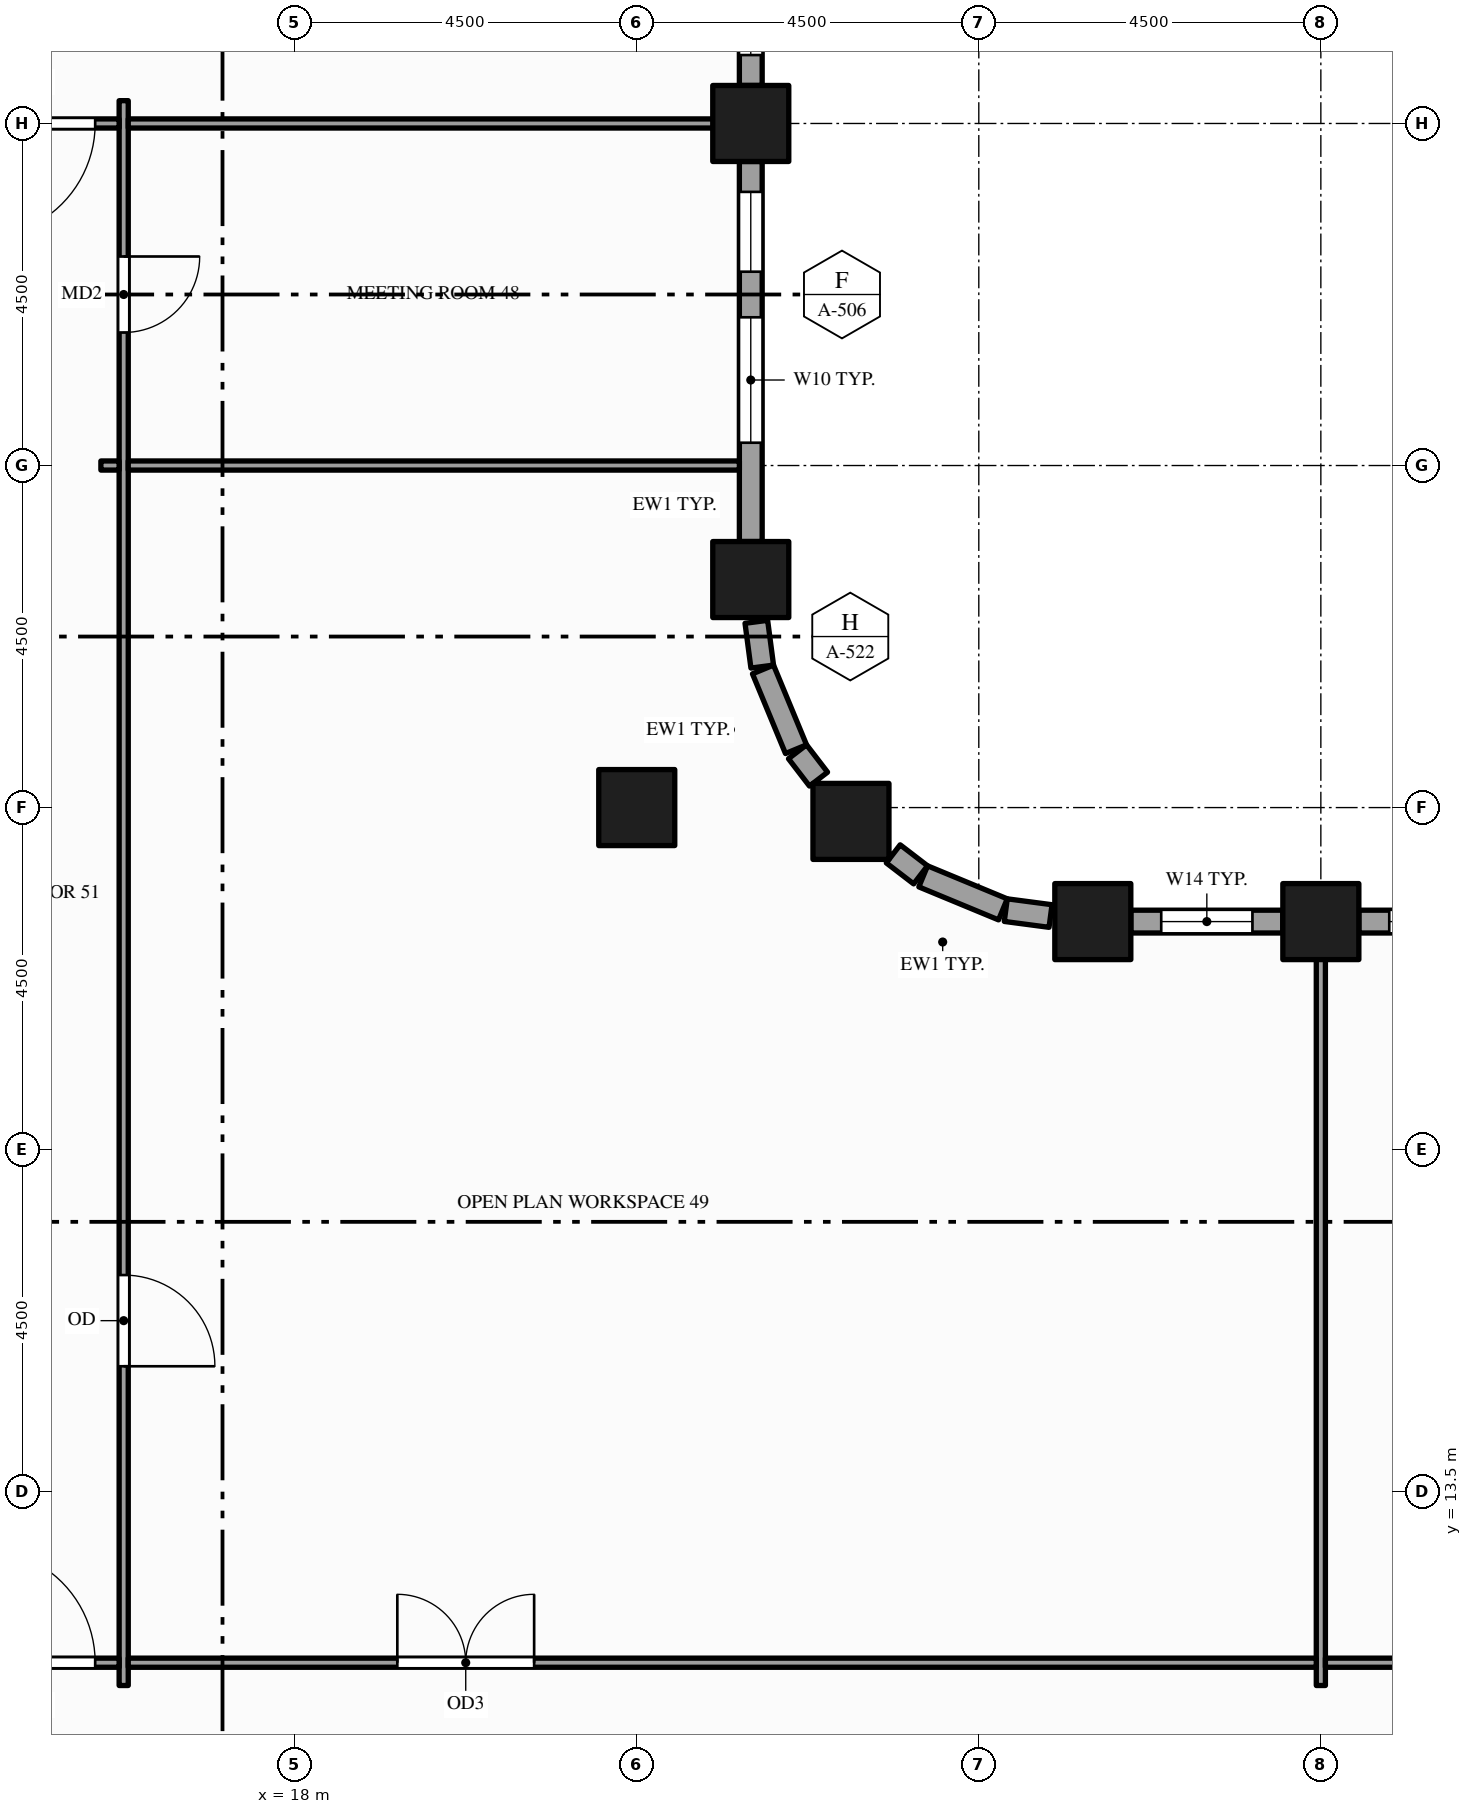
"""IFC4 building model, lengths in metres.
Left out: names, types, materials, properties, quantities, classifications, styles, units other than length and angle.
Written with IfcOpenShell. Run it as: python <this file> out.ifc"""

import sys

from ifc_helpers import new_model, si_unit, direction, frame, frame_2d, origin, origin_2d, place, context, subcontext, project, spatial, rectangle, hollow_rectangle, extrude, element, fill, save


model = new_model("IFC4")
c1 = context("Model", 3, precision=1e-05, world=origin(), true_north=direction((0.0, 1.0)))
c2 = subcontext(c1, "Body", "Model", "MODEL_VIEW")
j1 = project(units=[si_unit("LENGTHUNIT", "METRE"), si_unit("PLANEANGLEUNIT", "RADIAN")], contexts=[c1])
p1 = place(None, origin())
s1 = spatial("IfcSite", under=j1, at=p1, CompositionType="ELEMENT")
p2 = place(p1, origin())
s2 = spatial("IfcBuilding", under=s1, at=p2, CompositionType="ELEMENT")
p3 = place(p2, frame((0.0, 0.0, 119.0)))
s3 = spatial("IfcBuildingStorey", under=s2, at=p3, CompositionType="ELEMENT", Elevation=119.0)
for number, where, z_axis, x_axis in (
    (1, (22.5, 22.5, -0.15), (0.0, 0.0, 1.0), (1.0, 0.0, 0.0)),
    (2, (24.0, 25.5, -0.15), (0.0, 0.0, 1.0), (1.0, 0.0, 0.0)),
    (3, (24.0, 31.5, -0.15), (0.0, 0.0, 1.0), (1.0, 0.0, 0.0)),
    (4, (25.318, 22.318, -0.15), (0.0, 0.0, 1.0), (1.0, 0.0, 0.0)),
    (5, (28.5, 21.0, -0.15), (0.0, 0.0, 1.0), (1.0, 0.0, 0.0)),
    (6, (31.5, 21.0, -0.15), (0.0, 0.0, 1.0), (1.0, 0.0, 0.0)),
):
    element("IfcColumn", number, at=place(p3, frame(where, z_axis=z_axis, x_axis=x_axis)), inside=s3, PredefinedType="COLUMN", context=c2, shape_type="SweptSolid", body=[
        extrude(hollow_rectangle(XDim=1.0, YDim=1.0, WallThickness=0.05, at=origin_2d()), origin(), (0.0, 0.0, 1.0), 4.0),
    ])
p4 = place(p3, frame((35.5, 21.0, 0.0), z_axis=(0.0, 0.0, 1.0), x_axis=(-1.0, 0.0, 0.0)))
e7 = element("IfcWall", 7, at=p4, inside=s3, PredefinedType="STANDARD", context=c2, shape_type="SweptSolid", body=[
    extrude(rectangle(XDim=3.5, YDim=0.3, at=frame_2d((1.75, 0.0))), origin(), (0.0, 0.0, 1.0), 3.154),
])
p5 = place(p4, frame((0.4, 0.0, 0.9)))
e8 = element("IfcOpeningElement", 8, at=p5, cuts=e7, PredefinedType="OPENING", context=c2, shape_type="SweptSolid", body=[
    extrude(rectangle(XDim=1.05, YDim=2.0, at=frame_2d((0.525, 1.0))), frame((0.0, 0.16, 0.0), z_axis=(0.0, -1.0, 0.0), x_axis=(1.0, 0.0, 0.0)), (0.0, 0.0, 1.0), 0.32),
])
p6 = place(p4, frame((2.05, 0.0, 0.9)))
e9 = element("IfcOpeningElement", 9, at=p6, cuts=e7, PredefinedType="OPENING", context=c2, shape_type="SweptSolid", body=[
    extrude(rectangle(XDim=1.05, YDim=2.0, at=frame_2d((0.525, 1.0))), frame((0.0, 0.16, 0.0), z_axis=(0.0, -1.0, 0.0), x_axis=(1.0, 0.0, 0.0)), (0.0, 0.0, 1.0), 0.32),
])
p7 = place(p3, frame((31.0, 21.0, 0.0), z_axis=(0.0, 0.0, 1.0), x_axis=(-1.0, 0.0, 0.0)))
e10 = element("IfcWall", 10, at=p7, inside=s3, PredefinedType="STANDARD", context=c2, shape_type="SweptSolid", body=[
    extrude(rectangle(XDim=2.0, YDim=0.3, at=frame_2d((1.0, 0.0))), origin(), (0.0, 0.0, 1.0), 3.154),
])
p8 = place(p7, frame((0.4, 0.0, 0.9)))
e11 = element("IfcOpeningElement", 11, at=p8, cuts=e10, PredefinedType="OPENING", context=c2, shape_type="SweptSolid", body=[
    extrude(rectangle(XDim=1.2, YDim=2.0, at=frame_2d((0.6, 1.0))), frame((0.0, 0.16, 0.0), z_axis=(0.0, -1.0, 0.0), x_axis=(1.0, 0.0, 0.0)), (0.0, 0.0, 1.0), 0.32),
])
p9 = place(p3, frame((27.944, 21.073, 0.0), z_axis=(0.0, 0.0, 1.0), x_axis=(-0.991420685839, 0.130709692412, 0.0)))
e12 = element("IfcWall", 12, at=p9, inside=s3, PredefinedType="STANDARD", context=c2, shape_type="SweptSolid", body=[
    extrude(rectangle(XDim=0.594, YDim=0.3, at=frame_2d((0.297, 0.0))), origin(), (0.0, 0.0, 1.0), 3.154),
])
p10 = place(p3, frame((27.317, 21.161, 0.0), z_axis=(0.0, 0.0, 1.0), x_axis=(-0.923914616768, 0.382598720491, 0.0)))
e13 = element("IfcWall", 13, at=p10, inside=s3, PredefinedType="STANDARD", context=c2, shape_type="SweptSolid", body=[
    extrude(rectangle(XDim=1.135, YDim=0.3, at=frame_2d((0.568, 0.0))), origin(), (0.0, 0.0, 1.0), 2.938),
])
p11 = place(p3, frame((26.234, 21.615, 0.0), z_axis=(0.0, 0.0, 1.0), x_axis=(-0.793563062559, 0.608488016104, 0.0)))
e14 = element("IfcWall", 14, at=p11, inside=s3, PredefinedType="STANDARD", context=c2, shape_type="SweptSolid", body=[
    extrude(rectangle(XDim=0.454, YDim=0.3, at=frame_2d((0.227, 0.0))), origin(), (0.0, 0.0, 1.0), 3.154),
])
p12 = place(p3, frame((24.891, 22.874, 0.0), z_axis=(0.0, 0.0, 1.0), x_axis=(-0.608488016104, 0.793563062559, 0.0)))
e15 = element("IfcWall", 15, at=p12, inside=s3, PredefinedType="STANDARD", context=c2, shape_type="SweptSolid", body=[
    extrude(rectangle(XDim=0.454, YDim=0.3, at=frame_2d((0.227, 0.0))), origin(), (0.0, 0.0, 1.0), 2.76),
])
p13 = place(p3, frame((24.595, 23.268, 0.0), z_axis=(0.0, 0.0, 1.0), x_axis=(-0.382598720491, 0.923914616768, 0.0)))
e16 = element("IfcWall", 16, at=p13, inside=s3, PredefinedType="STANDARD", context=c2, shape_type="SweptSolid", body=[
    extrude(rectangle(XDim=1.135, YDim=0.3, at=frame_2d((0.568, 0.0))), origin(), (0.0, 0.0, 1.0), 3.154),
])
p14 = place(p3, frame((24.151, 24.355, 0.0), z_axis=(0.0, 0.0, 1.0), x_axis=(-0.130709692412, 0.991420685839, 0.0)))
e17 = element("IfcWall", 17, at=p14, inside=s3, PredefinedType="STANDARD", context=c2, shape_type="SweptSolid", body=[
    extrude(rectangle(XDim=0.594, YDim=0.3, at=frame_2d((0.297, 0.0))), origin(), (0.0, 0.0, 1.0), 3.154),
])
p15 = place(p3, frame((24.0, 26.0, 0.0), z_axis=(0.0, 0.0, 1.0), x_axis=(0.0, 1.0, 0.0)))
e18 = element("IfcWall", 18, at=p15, inside=s3, PredefinedType="STANDARD", context=c2, shape_type="SweptSolid", body=[
    extrude(rectangle(XDim=5.0, YDim=0.3, at=frame_2d((2.5, 0.0))), origin(), (0.0, 0.0, 1.0), 3.154),
])
p16 = place(p15, frame((1.3, 0.0, 0.9)))
e19 = element("IfcOpeningElement", 19, at=p16, cuts=e18, PredefinedType="OPENING", context=c2, shape_type="SweptSolid", body=[
    extrude(rectangle(XDim=1.65, YDim=2.0, at=frame_2d((0.825, 1.0))), frame((0.0, 0.16, 0.0), z_axis=(0.0, -1.0, 0.0), x_axis=(1.0, 0.0, 0.0)), (0.0, 0.0, 1.0), 0.32),
])
p17 = place(p15, frame((3.55, 0.0, 0.9)))
e20 = element("IfcOpeningElement", 20, at=p17, cuts=e18, PredefinedType="OPENING", context=c2, shape_type="SweptSolid", body=[
    extrude(rectangle(XDim=1.05, YDim=2.0, at=frame_2d((0.525, 1.0))), frame((0.0, 0.16, 0.0), z_axis=(0.0, -1.0, 0.0), x_axis=(1.0, 0.0, 0.0)), (0.0, 0.0, 1.0), 0.32),
])
p18 = place(p3, frame((24.0, 32.0, 0.0), z_axis=(0.0, 0.0, 1.0), x_axis=(0.0, 1.0, 0.0)))
e21 = element("IfcWall", 21, at=p18, inside=s3, PredefinedType="STANDARD", context=c2, shape_type="SweptSolid", body=[
    extrude(rectangle(XDim=3.5, YDim=0.3, at=frame_2d((1.75, 0.0))), origin(), (0.0, 0.0, 1.0), 3.154),
])
p19 = place(p18, frame((0.4, 0.0, 0.9)))
e22 = element("IfcOpeningElement", 22, at=p19, cuts=e21, PredefinedType="OPENING", context=c2, shape_type="SweptSolid", body=[
    extrude(rectangle(XDim=1.05, YDim=2.0, at=frame_2d((0.525, 1.0))), frame((0.0, 0.16, 0.0), z_axis=(0.0, -1.0, 0.0), x_axis=(1.0, 0.0, 0.0)), (0.0, 0.0, 1.0), 0.32),
])
p20 = place(p18, frame((2.05, 0.0, 0.9)))
e23 = element("IfcOpeningElement", 23, at=p20, cuts=e21, PredefinedType="OPENING", context=c2, shape_type="SweptSolid", body=[
    extrude(rectangle(XDim=1.05, YDim=2.0, at=frame_2d((0.525, 1.0))), frame((0.0, 0.16, 0.0), z_axis=(0.0, -1.0, 0.0), x_axis=(1.0, 0.0, 0.0)), (0.0, 0.0, 1.0), 0.32),
])
p21 = place(p3, frame((15.75, 10.95, 0.0), z_axis=(0.0, 0.0, 1.0), x_axis=(0.0, 1.0, 0.0)))
e24 = element("IfcWall", 24, at=p21, inside=s3, PredefinedType="PARTITIONING", context=c2, shape_type="SweptSolid", body=[
    extrude(rectangle(XDim=20.85, YDim=0.12, at=frame_2d((10.425, 0.0))), origin(), (0.0, 0.0, 1.0), 2.6),
])
p22 = place(p21, frame((17.8, 0.0, 0.0)))
e25 = element("IfcOpeningElement", 25, at=p22, cuts=e24, PredefinedType="OPENING", context=c2, shape_type="SweptSolid", body=[
    extrude(rectangle(XDim=1.0, YDim=2.1, at=frame_2d((0.5, 1.05))), frame((0.0, 0.07, 0.0), z_axis=(0.0, -1.0, 0.0), x_axis=(1.0, 0.0, 0.0)), (0.0, 0.0, 1.0), 0.14),
])
p23 = place(p21, frame((4.2, 0.0, 0.0)))
e26 = element("IfcOpeningElement", 26, at=p23, cuts=e24, PredefinedType="OPENING", context=c2, shape_type="SweptSolid", body=[
    extrude(rectangle(XDim=1.2, YDim=2.1, at=frame_2d((0.6, 1.05))), frame((0.0, 0.07, 0.0), z_axis=(0.0, -1.0, 0.0), x_axis=(1.0, 0.0, 0.0)), (0.0, 0.0, 1.0), 0.14),
])
p24 = place(p3, frame((31.5, 10.95, 0.0), z_axis=(0.0, 0.0, 1.0), x_axis=(0.0, 1.0, 0.0)))
e27 = element("IfcWall", 27, at=p24, inside=s3, PredefinedType="PARTITIONING", context=c2, shape_type="SweptSolid", body=[
    extrude(rectangle(XDim=9.9, YDim=0.12, at=frame_2d((4.95, 0.0))), origin(), (0.0, 0.0, 1.0), 2.938),
])
p25 = place(p3, frame((13.56, 11.25, 0.0), z_axis=(0.0, 0.0, 1.0), x_axis=(1.0, 0.0, 0.0)))
e28 = element("IfcWall", 28, at=p25, inside=s3, PredefinedType="PARTITIONING", context=c2, shape_type="SweptSolid", body=[
    extrude(rectangle(XDim=2.13, YDim=0.12, at=frame_2d((1.065, 0.0))), origin(), (0.0, 0.0, 1.0), 2.938),
])
p26 = place(p25, frame((0.315, 0.0, 0.0)))
e29 = element("IfcOpeningElement", 29, at=p26, cuts=e28, PredefinedType="OPENING", context=c2, shape_type="SweptSolid", body=[
    extrude(rectangle(XDim=1.5, YDim=2.1, at=frame_2d((0.75, 1.05))), frame((0.0, 0.07, 0.0), z_axis=(0.0, -1.0, 0.0), x_axis=(1.0, 0.0, 0.0)), (0.0, 0.0, 1.0), 0.14),
])
p27 = place(p3, frame((15.81, 11.25, 0.0), z_axis=(0.0, 0.0, 1.0), x_axis=(1.0, 0.0, 0.0)))
e30 = element("IfcWall", 30, at=p27, inside=s3, PredefinedType="PARTITIONING", context=c2, shape_type="SweptSolid", body=[
    extrude(rectangle(XDim=15.63, YDim=0.12, at=frame_2d((7.815, 0.0))), origin(), (0.0, 0.0, 1.0), 2.76),
])
p28 = place(p27, frame((3.54, 0.0, 0.0)))
e31 = element("IfcOpeningElement", 31, at=p28, cuts=e30, PredefinedType="OPENING", context=c2, shape_type="SweptSolid", body=[
    extrude(rectangle(XDim=1.8, YDim=2.1, at=frame_2d((0.9, 1.05))), frame((0.0, 0.07, 0.0), z_axis=(0.0, -1.0, 0.0), x_axis=(1.0, 0.0, 0.0)), (0.0, 0.0, 1.0), 0.14),
])
p29 = place(p3, frame((31.56, 11.25, 0.0), z_axis=(0.0, 0.0, 1.0), x_axis=(1.0, 0.0, 0.0)))
e32 = element("IfcWall", 32, at=p29, inside=s3, PredefinedType="PARTITIONING", context=c2, shape_type="SweptSolid", body=[
    extrude(rectangle(XDim=4.38, YDim=0.12, at=frame_2d((2.19, 0.0))), origin(), (0.0, 0.0, 1.0), 2.938),
])
p30 = place(p29, frame((1.59, 0.0, 0.0)))
e33 = element("IfcOpeningElement", 33, at=p30, cuts=e32, PredefinedType="OPENING", context=c2, shape_type="SweptSolid", body=[
    extrude(rectangle(XDim=1.2, YDim=2.1, at=frame_2d((0.6, 1.05))), frame((0.0, 0.07, 0.0), z_axis=(0.0, -1.0, 0.0), x_axis=(1.0, 0.0, 0.0)), (0.0, 0.0, 1.0), 0.14),
])
p31 = place(p3, frame((15.45, 27.0, 0.0), z_axis=(0.0, 0.0, 1.0), x_axis=(1.0, 0.0, 0.0)))
e34 = element("IfcWall", 34, at=p31, inside=s3, PredefinedType="PARTITIONING", context=c2, shape_type="SweptSolid", body=[
    extrude(rectangle(XDim=0.24, YDim=0.12, at=frame_2d((0.12, 0.0))), origin(), (0.0, 0.0, 1.0), 2.938),
])
p32 = place(p3, frame((15.81, 27.0, 0.0), z_axis=(0.0, 0.0, 1.0), x_axis=(1.0, 0.0, 0.0)))
e35 = element("IfcWall", 35, at=p32, inside=s3, PredefinedType="PARTITIONING", context=c2, shape_type="SweptSolid", body=[
    extrude(rectangle(XDim=8.04, YDim=0.12, at=frame_2d((4.02, 0.0))), origin(), (0.0, 0.0, 1.0), 2.938),
])
p33 = place(p3, frame((13.56, 31.5, 0.0), z_axis=(0.0, 0.0, 1.0), x_axis=(1.0, 0.0, 0.0)))
e36 = element("IfcWall", 36, at=p33, inside=s3, PredefinedType="PARTITIONING", context=c2, shape_type="SweptSolid", body=[
    extrude(rectangle(XDim=2.13, YDim=0.12, at=frame_2d((1.065, 0.0))), origin(), (0.0, 0.0, 1.0), 2.938),
])
p34 = place(p33, frame((0.315, 0.0, 0.0)))
e37 = element("IfcOpeningElement", 37, at=p34, cuts=e36, PredefinedType="OPENING", context=c2, shape_type="SweptSolid", body=[
    extrude(rectangle(XDim=1.5, YDim=2.1, at=frame_2d((0.75, 1.05))), frame((0.0, 0.07, 0.0), z_axis=(0.0, -1.0, 0.0), x_axis=(1.0, 0.0, 0.0)), (0.0, 0.0, 1.0), 0.14),
])
p35 = place(p3, frame((15.81, 31.5, 0.0), z_axis=(0.0, 0.0, 1.0), x_axis=(1.0, 0.0, 0.0)))
e38 = element("IfcWall", 38, at=p35, inside=s3, PredefinedType="PARTITIONING", context=c2, shape_type="SweptSolid", body=[
    extrude(rectangle(XDim=8.04, YDim=0.12, at=frame_2d((4.02, 0.0))), origin(), (0.0, 0.0, 1.0), 2.938),
])
p36 = place(p6, origin())
e39 = element("IfcWindow", 39, at=p36, inside=s3, PartitioningType="SINGLE_PANEL", PredefinedType="WINDOW", context=c2, shape_type="SweptSolid", body=[
    extrude(rectangle(XDim=1.05, YDim=2.0, at=frame_2d((0.525, 1.0))), frame((0.0, 0.03, 0.0), z_axis=(0.0, -1.0, 0.0), x_axis=(1.0, 0.0, 0.0)), (0.0, 0.0, 1.0), 0.06),
])
fill(e9, e39)
p37 = place(p8, origin())
e40 = element("IfcWindow", 40, at=p37, inside=s3, PartitioningType="SINGLE_PANEL", PredefinedType="WINDOW", context=c2, shape_type="SweptSolid", body=[
    extrude(rectangle(XDim=1.2, YDim=2.0, at=frame_2d((0.6, 1.0))), frame((0.0, 0.03, 0.0), z_axis=(0.0, -1.0, 0.0), x_axis=(1.0, 0.0, 0.0)), (0.0, 0.0, 1.0), 0.06),
])
fill(e11, e40)
p38 = place(p16, origin())
e41 = element("IfcWindow", 41, at=p38, inside=s3, PartitioningType="SINGLE_PANEL", PredefinedType="WINDOW", context=c2, shape_type="SweptSolid", body=[
    extrude(rectangle(XDim=1.65, YDim=2.0, at=frame_2d((0.825, 1.0))), frame((0.0, 0.03, 0.0), z_axis=(0.0, -1.0, 0.0), x_axis=(1.0, 0.0, 0.0)), (0.0, 0.0, 1.0), 0.06),
])
fill(e19, e41)
p39 = place(p17, origin())
e42 = element("IfcWindow", 42, at=p39, inside=s3, PartitioningType="SINGLE_PANEL", PredefinedType="WINDOW", context=c2, shape_type="SweptSolid", body=[
    extrude(rectangle(XDim=1.05, YDim=2.0, at=frame_2d((0.525, 1.0))), frame((0.0, 0.03, 0.0), z_axis=(0.0, -1.0, 0.0), x_axis=(1.0, 0.0, 0.0)), (0.0, 0.0, 1.0), 0.06),
])
fill(e20, e42)
p40 = place(p19, origin())
e43 = element("IfcWindow", 43, at=p40, inside=s3, PartitioningType="SINGLE_PANEL", PredefinedType="WINDOW", context=c2, shape_type="SweptSolid", body=[
    extrude(rectangle(XDim=1.05, YDim=2.0, at=frame_2d((0.525, 1.0))), frame((0.0, 0.03, 0.0), z_axis=(0.0, -1.0, 0.0), x_axis=(1.0, 0.0, 0.0)), (0.0, 0.0, 1.0), 0.06),
])
fill(e22, e43)
p41 = place(p28, origin())
e44 = element("IfcDoor", 44, at=p41, inside=s3, OperationType="DOUBLE_DOOR_SINGLE_SWING", PredefinedType="DOOR", context=c2, shape_type="SweptSolid", body=[
    extrude(rectangle(XDim=1.8, YDim=2.1, at=frame_2d((0.9, 1.05))), frame((0.0, 0.025, 0.0), z_axis=(0.0, -1.0, 0.0), x_axis=(1.0, 0.0, 0.0)), (0.0, 0.0, 1.0), 0.05),
])
fill(e31, e44)
p42 = place(p26, origin())
e45 = element("IfcDoor", 45, at=p42, inside=s3, OperationType="SINGLE_SWING_LEFT", PredefinedType="DOOR", context=c2, shape_type="SweptSolid", body=[
    extrude(rectangle(XDim=1.5, YDim=2.1, at=frame_2d((0.75, 1.05))), frame((0.0, 0.025, 0.0), z_axis=(0.0, -1.0, 0.0), x_axis=(1.0, 0.0, 0.0)), (0.0, 0.0, 1.0), 0.05),
])
fill(e29, e45)
p43 = place(p34, origin())
e46 = element("IfcDoor", 46, at=p43, inside=s3, OperationType="SINGLE_SWING_LEFT", PredefinedType="DOOR", context=c2, shape_type="SweptSolid", body=[
    extrude(rectangle(XDim=1.5, YDim=2.1, at=frame_2d((0.75, 1.05))), frame((0.0, 0.025, 0.0), z_axis=(0.0, -1.0, 0.0), x_axis=(1.0, 0.0, 0.0)), (0.0, 0.0, 1.0), 0.05),
])
fill(e37, e46)
p44 = place(p22, origin())
e47 = element("IfcDoor", 47, at=p44, inside=s3, OperationType="SINGLE_SWING_RIGHT", PredefinedType="DOOR", context=c2, shape_type="SweptSolid", body=[
    extrude(rectangle(XDim=1.0, YDim=2.1, at=frame_2d((0.5, 1.05))), frame((0.0, 0.025, 0.0), z_axis=(0.0, -1.0, 0.0), x_axis=(1.0, 0.0, 0.0)), (0.0, 0.0, 1.0), 0.05),
])
fill(e25, e47)
p45 = place(p23, origin())
e48 = element("IfcDoor", 48, at=p45, inside=s3, OperationType="SINGLE_SWING_LEFT", PredefinedType="DOOR", context=c2, shape_type="SweptSolid", body=[
    extrude(rectangle(XDim=1.2, YDim=2.1, at=frame_2d((0.6, 1.05))), frame((0.0, 0.025, 0.0), z_axis=(0.0, -1.0, 0.0), x_axis=(1.0, 0.0, 0.0)), (0.0, 0.0, 1.0), 0.05),
])
fill(e26, e48)
save(model, sys.argv[1])
